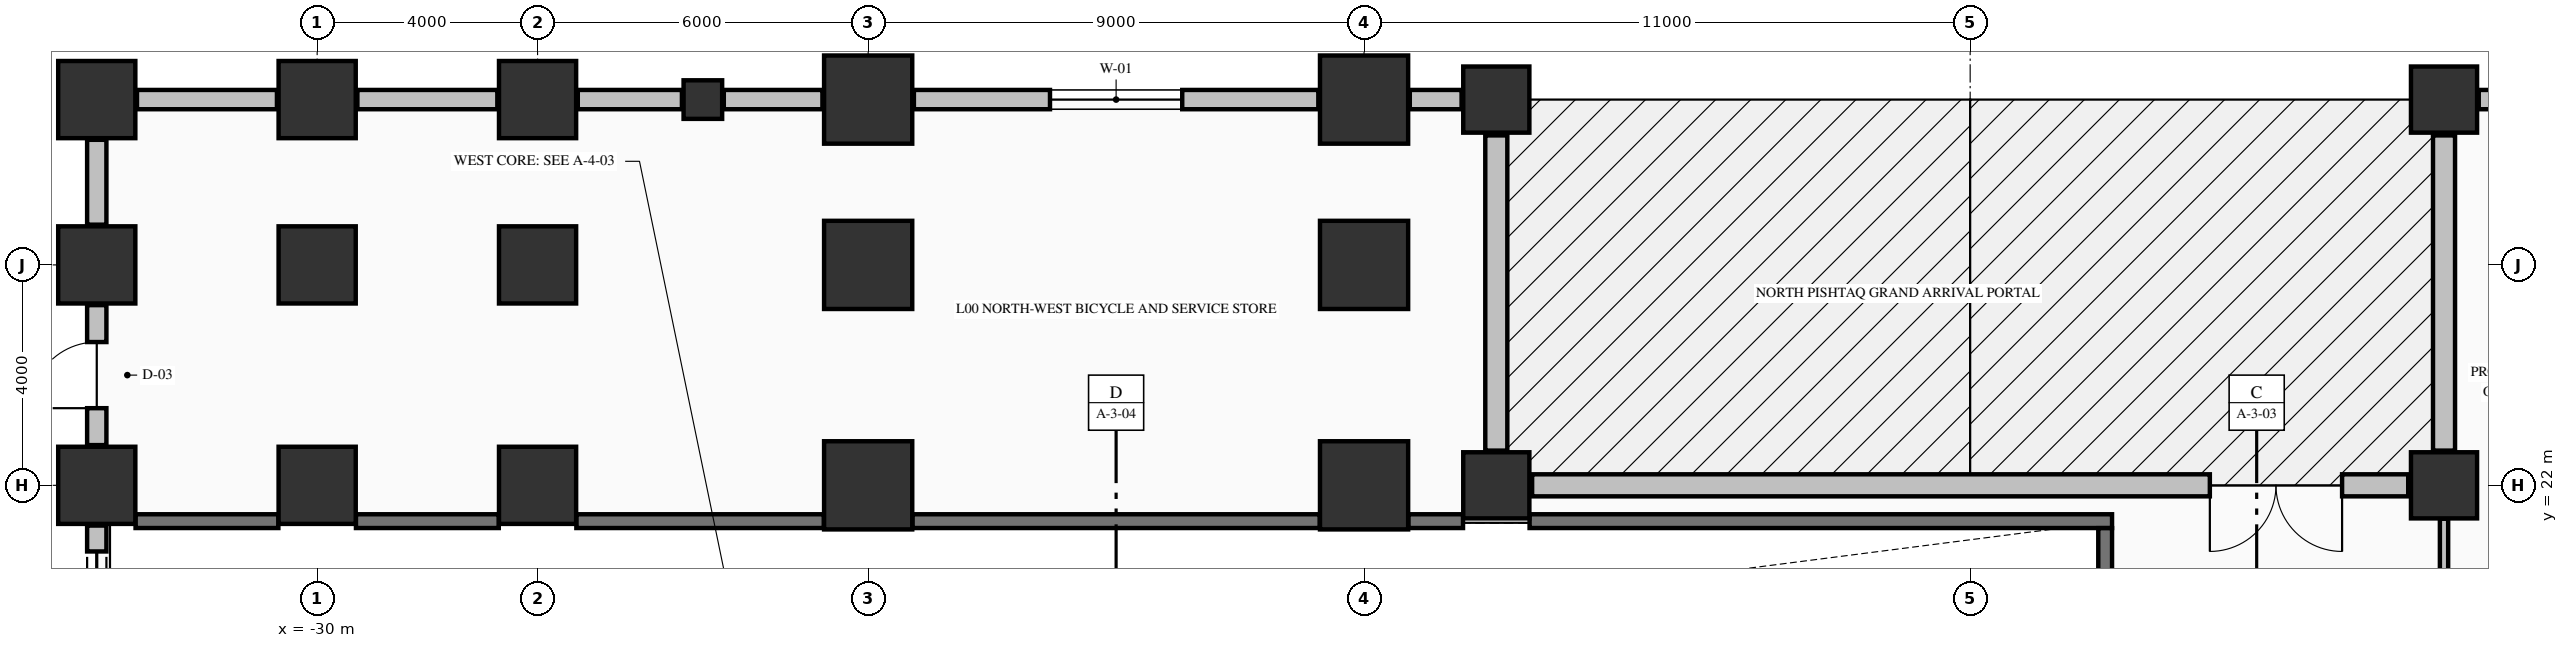
"""IFC4 building model, lengths in metres.
Left out: names, types, materials, properties, quantities, classifications, styles, units other than length and angle.
Written with IfcOpenShell. Run it as: python <this file> out.ifc"""

import sys

from ifc_helpers import new_model, si_unit, direction, frame, frame_2d, origin, origin_2d, place, context, subcontext, project, spatial, rectangle, extrude, element, fill, save


model = new_model("IFC4")
c1 = context("Model", 3, precision=1e-05, world=origin(), true_north=direction((0.0, 1.0)))
c2 = subcontext(c1, "Body", "Model", "MODEL_VIEW")
j1 = project(units=[si_unit("LENGTHUNIT", "METRE"), si_unit("PLANEANGLEUNIT", "RADIAN")], contexts=[c1])
p1 = place(None, origin())
s1 = spatial("IfcSite", under=j1, at=p1, CompositionType="ELEMENT")
p2 = place(p1, origin())
s2 = spatial("IfcBuilding", under=s1, at=p2, CompositionType="ELEMENT")
p3 = place(p2, origin())
s3 = spatial("IfcBuildingStorey", under=s2, at=p3, CompositionType="ELEMENT", Elevation=0.0)
for number, where, z_axis, x_axis in (
    (1, (-34.0, 22.0, 0.0), (0.0, 0.0, 1.0), (1.0, 0.0, 0.0)),
    (2, (-34.0, 26.0, 0.0), (0.0, 0.0, 1.0), (1.0, 0.0, 0.0)),
    (3, (-34.0, 29.0, 0.0), (0.0, 0.0, 1.0), (1.0, 0.0, 0.0)),
    (4, (-30.0, 22.0, 0.0), (0.0, 0.0, 1.0), (1.0, 0.0, 0.0)),
    (5, (-30.0, 26.0, 0.0), (0.0, 0.0, 1.0), (1.0, 0.0, 0.0)),
    (6, (-30.0, 29.0, 0.0), (0.0, 0.0, 1.0), (1.0, 0.0, 0.0)),
    (7, (-26.0, 22.0, 0.0), (0.0, 0.0, 1.0), (1.0, 0.0, 0.0)),
    (8, (-26.0, 26.0, 0.0), (0.0, 0.0, 1.0), (1.0, 0.0, 0.0)),
    (9, (-26.0, 29.0, 0.0), (0.0, 0.0, 1.0), (1.0, 0.0, 0.0)),
):
    element("IfcColumn", number, at=place(p3, frame(where, z_axis=z_axis, x_axis=x_axis)), inside=s3, PredefinedType="COLUMN", context=c2, shape_type="SweptSolid", body=[
        extrude(rectangle(XDim=1.4, YDim=1.4, at=origin_2d()), origin(), (0.0, 0.0, 1.0), 5.09),
    ])
for number, where, z_axis, x_axis in (
    (10, (-20.0, 22.0, 0.0), (0.0, 0.0, 1.0), (1.0, 0.0, 0.0)),
    (11, (-20.0, 26.0, 0.0), (0.0, 0.0, 1.0), (1.0, 0.0, 0.0)),
    (12, (-20.0, 29.0, 0.0), (0.0, 0.0, 1.0), (1.0, 0.0, 0.0)),
    (13, (-11.0, 22.0, 0.0), (0.0, 0.0, 1.0), (1.0, 0.0, 0.0)),
    (14, (-11.0, 26.0, 0.0), (0.0, 0.0, 1.0), (1.0, 0.0, 0.0)),
    (15, (-11.0, 29.0, 0.0), (0.0, 0.0, 1.0), (1.0, 0.0, 0.0)),
):
    element("IfcColumn", number, at=place(p3, frame(where, z_axis=z_axis, x_axis=x_axis)), inside=s3, PredefinedType="COLUMN", context=c2, shape_type="SweptSolid", body=[
        extrude(rectangle(XDim=1.6, YDim=1.6, at=origin_2d()), origin(), (0.0, 0.0, 1.0), 5.09),
    ])
for number, where, z_axis, x_axis in (
    (16, (-8.6, 22.0, 0.0), (0.0, 0.0, 1.0), (1.0, 0.0, 0.0)),
    (17, (8.6, 22.0, 0.0), (0.0, 0.0, 1.0), (1.0, 0.0, 0.0)),
    (18, (-8.6, 29.0, 0.0), (0.0, 0.0, 1.0), (1.0, 0.0, 0.0)),
    (19, (8.6, 29.0, 0.0), (0.0, 0.0, 1.0), (1.0, 0.0, 0.0)),
):
    element("IfcColumn", number, at=place(p3, frame(where, z_axis=z_axis, x_axis=x_axis)), inside=s3, PredefinedType="COLUMN", context=c2, shape_type="SweptSolid", body=[
        extrude(rectangle(XDim=1.2, YDim=1.2, at=origin_2d()), origin(), (0.0, 0.0, 1.0), 5.09),
    ])
p4 = place(p3, frame((-23.0, 29.0, 0.0), z_axis=(0.0, 0.0, 1.0), x_axis=(1.0, 0.0, 0.0)))
e20 = element("IfcColumn", 20, at=p4, inside=s3, PredefinedType="PILASTER", context=c2, shape_type="SweptSolid", body=[
    extrude(rectangle(XDim=0.7, YDim=0.7, at=origin_2d()), origin(), (0.0, 0.0, 1.0), 5.09),
])
for number, where, z_axis, x_axis in (
    (21, (-30.73, 29.0, 0.0), (0.0, 0.0, 1.0), (-1.0, 0.0, 0.0)),
    (22, (-26.73, 29.0, 0.0), (0.0, 0.0, 1.0), (-1.0, 0.0, 0.0)),
):
    element("IfcWall", number, at=place(p3, frame(where, z_axis=z_axis, x_axis=x_axis)), inside=s3, PredefinedType="STANDARD", context=c2, shape_type="SweptSolid", body=[
        extrude(rectangle(XDim=2.54, YDim=0.35, at=frame_2d((1.27, 0.0))), origin(), (0.0, 0.0, 1.0), 4.482),
    ])
p5 = place(p3, frame((-23.38, 29.0, 0.0), z_axis=(0.0, 0.0, 1.0), x_axis=(-1.0, 0.0, 0.0)))
e23 = element("IfcWall", 23, at=p5, inside=s3, PredefinedType="STANDARD", context=c2, shape_type="SweptSolid", body=[
    extrude(rectangle(XDim=1.89, YDim=0.35, at=frame_2d((0.945, 0.0))), origin(), (0.0, 0.0, 1.0), 4.482),
])
p6 = place(p3, frame((-20.83, 29.0, 0.0), z_axis=(0.0, 0.0, 1.0), x_axis=(-1.0, 0.0, 0.0)))
e24 = element("IfcWall", 24, at=p6, inside=s3, PredefinedType="STANDARD", context=c2, shape_type="SweptSolid", body=[
    extrude(rectangle(XDim=1.79, YDim=0.35, at=frame_2d((0.895, 0.0))), origin(), (0.0, 0.0, 1.0), 4.482),
])
p7 = place(p3, frame((-11.83, 29.0, 0.0), z_axis=(0.0, 0.0, 1.0), x_axis=(-1.0, 0.0, 0.0)))
e25 = element("IfcWall", 25, at=p7, inside=s3, PredefinedType="STANDARD", context=c2, shape_type="SweptSolid", body=[
    extrude(rectangle(XDim=7.34, YDim=0.35, at=frame_2d((3.67, 0.0))), origin(), (0.0, 0.0, 1.0), 4.482),
])
p8 = place(p7, frame((2.47, 0.0, 0.85)))
e26 = element("IfcOpeningElement", 26, at=p8, cuts=e25, PredefinedType="OPENING", context=c2, shape_type="SweptSolid", body=[
    extrude(rectangle(XDim=2.4, YDim=2.1, at=frame_2d((1.2, 1.05))), frame((0.0, 0.185, 0.0), z_axis=(0.0, -1.0, 0.0), x_axis=(1.0, 0.0, 0.0)), (0.0, 0.0, 1.0), 0.37),
])
for number, where, z_axis, x_axis in (
    (27, (-9.23, 29.0, 0.0), (0.0, 0.0, 1.0), (-1.0, 0.0, 0.0)),
    (28, (10.17, 29.0, 0.0), (0.0, 0.0, 1.0), (-1.0, 0.0, 0.0)),
):
    element("IfcWall", number, at=place(p3, frame(where, z_axis=z_axis, x_axis=x_axis)), inside=s3, PredefinedType="STANDARD", context=c2, shape_type="SweptSolid", body=[
        extrude(rectangle(XDim=0.94, YDim=0.35, at=frame_2d((0.47, 0.0))), origin(), (0.0, 0.0, 1.0), 4.482),
    ])
p9 = place(p3, frame((-34.0, 16.73, 0.0), z_axis=(0.0, 0.0, 1.0), x_axis=(0.0, 1.0, 0.0)))
e29 = element("IfcWall", 29, at=p9, inside=s3, PredefinedType="STANDARD", context=c2, shape_type="SweptSolid", body=[
    extrude(rectangle(XDim=4.54, YDim=0.35, at=frame_2d((2.27, 0.0))), origin(), (0.0, 0.0, 1.0), 4.482),
])
p10 = place(p9, frame((0.47, 0.0, 0.0)))
e30 = element("IfcOpeningElement", 30, at=p10, cuts=e29, PredefinedType="OPENING", context=c2, shape_type="SweptSolid", body=[
    extrude(rectangle(XDim=3.6, YDim=3.2, at=frame_2d((1.8, 1.6))), frame((0.0, 0.185, 0.0), z_axis=(0.0, -1.0, 0.0), x_axis=(1.0, 0.0, 0.0)), (0.0, 0.0, 1.0), 0.37),
])
p11 = place(p3, frame((-34.0, 22.73, 0.0), z_axis=(0.0, 0.0, 1.0), x_axis=(0.0, 1.0, 0.0)))
e31 = element("IfcWall", 31, at=p11, inside=s3, PredefinedType="STANDARD", context=c2, shape_type="SweptSolid", body=[
    extrude(rectangle(XDim=2.54, YDim=0.35, at=frame_2d((1.27, 0.0))), origin(), (0.0, 0.0, 1.0), 4.482),
])
p12 = place(p11, frame((0.67, 0.0, 0.0)))
e32 = element("IfcOpeningElement", 32, at=p12, cuts=e31, PredefinedType="OPENING", context=c2, shape_type="SweptSolid", body=[
    extrude(rectangle(XDim=1.2, YDim=2.2, at=frame_2d((0.6, 1.1))), frame((0.0, 0.185, 0.0), z_axis=(0.0, -1.0, 0.0), x_axis=(1.0, 0.0, 0.0)), (0.0, 0.0, 1.0), 0.37),
])
p13 = place(p3, frame((-34.0, 26.73, 0.0), z_axis=(0.0, 0.0, 1.0), x_axis=(0.0, 1.0, 0.0)))
e33 = element("IfcWall", 33, at=p13, inside=s3, PredefinedType="STANDARD", context=c2, shape_type="SweptSolid", body=[
    extrude(rectangle(XDim=1.54, YDim=0.35, at=frame_2d((0.77, 0.0))), origin(), (0.0, 0.0, 1.0), 4.482),
])
for number, where, z_axis, x_axis in (
    (34, (-8.6, 22.63, 0.0), (0.0, 0.0, 1.0), (0.0, 1.0, 0.0)),
    (35, (8.6, 28.35, 0.0), (0.0, 0.0, 1.0), (0.0, -1.0, 0.0)),
):
    element("IfcWall", number, at=place(p3, frame(where, z_axis=z_axis, x_axis=x_axis)), inside=s3, PredefinedType="STANDARD", context=c2, shape_type="SweptSolid", body=[
        extrude(rectangle(XDim=5.72, YDim=0.4, at=frame_2d((2.86, 0.0))), origin(), (0.0, 0.0, 1.0), 4.132),
    ])
p14 = place(p3, frame((7.95, 22.0, 0.0), z_axis=(0.0, 0.0, 1.0), x_axis=(-1.0, 0.0, 0.0)))
e36 = element("IfcWall", 36, at=p14, inside=s3, PredefinedType="STANDARD", context=c2, shape_type="SweptSolid", body=[
    extrude(rectangle(XDim=15.9, YDim=0.4, at=frame_2d((7.95, 0.0))), origin(), (0.0, 0.0, 1.0), 4.132),
])
p15 = place(p14, frame((1.2, 0.0, 0.0)))
e37 = element("IfcOpeningElement", 37, at=p15, cuts=e36, PredefinedType="OPENING", context=c2, shape_type="SweptSolid", body=[
    extrude(rectangle(XDim=2.4, YDim=2.6, at=frame_2d((1.2, 1.3))), frame((0.0, 0.21, 0.0), z_axis=(0.0, -1.0, 0.0), x_axis=(1.0, 0.0, 0.0)), (0.0, 0.0, 1.0), 0.42),
])
for number, where, z_axis, x_axis in (
    (38, (-33.296, 21.35, 0.0), (0.0, 0.0, 1.0), (1.0, 0.0, 0.0)),
    (39, (-29.296, 21.35, 0.0), (0.0, 0.0, 1.0), (1.0, 0.0, 0.0)),
):
    element("IfcWall", number, at=place(p3, frame(where, z_axis=z_axis, x_axis=x_axis)), inside=s3, PredefinedType="SOLIDWALL", context=c2, shape_type="SweptSolid", body=[
        extrude(rectangle(XDim=2.592, YDim=0.25, at=frame_2d((1.296, 0.0))), origin(), (0.0, 0.0, 1.0), 5.09),
    ])
p16 = place(p3, frame((-25.296, 21.35, 0.0), z_axis=(0.0, 0.0, 1.0), x_axis=(1.0, 0.0, 0.0)))
e40 = element("IfcWall", 40, at=p16, inside=s3, PredefinedType="SOLIDWALL", context=c2, shape_type="SweptSolid", body=[
    extrude(rectangle(XDim=4.492, YDim=0.25, at=frame_2d((2.246, 0.0))), origin(), (0.0, 0.0, 1.0), 5.09),
])
p17 = place(p3, frame((-19.196, 21.35, 0.0), z_axis=(0.0, 0.0, 1.0), x_axis=(1.0, 0.0, 0.0)))
e41 = element("IfcWall", 41, at=p17, inside=s3, PredefinedType="SOLIDWALL", context=c2, shape_type="SweptSolid", body=[
    extrude(rectangle(XDim=7.392, YDim=0.25, at=frame_2d((3.696, 0.0))), origin(), (0.0, 0.0, 1.0), 5.09),
])
p18 = place(p3, frame((-10.196, 21.35, 0.0), z_axis=(0.0, 0.0, 1.0), x_axis=(1.0, 0.0, 0.0)))
e42 = element("IfcWall", 42, at=p18, inside=s3, PredefinedType="SOLIDWALL", context=c2, shape_type="SweptSolid", body=[
    extrude(rectangle(XDim=0.992, YDim=0.25, at=frame_2d((0.496, 0.0))), origin(), (0.0, 0.0, 1.0), 5.09),
])
p19 = place(p3, frame((-7.996, 21.35, 0.0), z_axis=(0.0, 0.0, 1.0), x_axis=(1.0, 0.0, 0.0)))
e43 = element("IfcWall", 43, at=p19, inside=s3, PredefinedType="SOLIDWALL", context=c2, shape_type="SweptSolid", body=[
    extrude(rectangle(XDim=10.571, YDim=0.25, at=frame_2d((5.286, 0.0))), origin(), (0.0, 0.0, 1.0), 5.09),
])
p20 = place(p3, frame((2.45, 16.777, 0.0), z_axis=(0.0, 0.0, 1.0), x_axis=(0.0, 1.0, 0.0)))
e44 = element("IfcWall", 44, at=p20, inside=s3, PredefinedType="SOLIDWALL", context=c2, shape_type="SweptSolid", body=[
    extrude(rectangle(XDim=4.446, YDim=0.25, at=frame_2d((2.223, 0.0))), origin(), (0.0, 0.0, 1.0), 5.09),
])
p21 = place(p3, frame((8.6, 18.728, 0.0), z_axis=(0.0, 0.0, 1.0), x_axis=(0.0, 1.0, 0.0)))
e45 = element("IfcWall", 45, at=p21, inside=s3, PredefinedType="PARTITIONING", context=c2, shape_type="SweptSolid", body=[
    extrude(rectangle(XDim=2.666, YDim=0.15, at=frame_2d((1.333, 0.0))), origin(), (0.0, 0.0, 1.0), 4.132),
])
p22 = place(p8, origin())
e46 = element("IfcWindow", 46, at=p22, inside=s3, PartitioningType="SINGLE_PANEL", PredefinedType="WINDOW", context=c2, shape_type="SweptSolid", body=[
    extrude(rectangle(XDim=2.4, YDim=2.1, at=frame_2d((1.2, 1.05))), frame((0.0, 0.03, 0.0), z_axis=(0.0, -1.0, 0.0), x_axis=(1.0, 0.0, 0.0)), (0.0, 0.0, 1.0), 0.06),
])
fill(e26, e46)
p23 = place(p10, origin())
e47 = element("IfcDoor", 47, at=p23, inside=s3, OperationType="ROLLINGUP", PredefinedType="DOOR", context=c2, shape_type="SweptSolid", body=[
    extrude(rectangle(XDim=3.6, YDim=3.2, at=frame_2d((1.8, 1.6))), frame((0.0, 0.025, 0.0), z_axis=(0.0, -1.0, 0.0), x_axis=(1.0, 0.0, 0.0)), (0.0, 0.0, 1.0), 0.05),
])
fill(e30, e47)
p24 = place(p12, origin())
e48 = element("IfcDoor", 48, at=p24, inside=s3, OperationType="SINGLE_SWING_LEFT", PredefinedType="DOOR", context=c2, shape_type="SweptSolid", body=[
    extrude(rectangle(XDim=1.2, YDim=2.2, at=frame_2d((0.6, 1.1))), frame((0.0, 0.025, 0.0), z_axis=(0.0, -1.0, 0.0), x_axis=(1.0, 0.0, 0.0)), (0.0, 0.0, 1.0), 0.05),
])
fill(e32, e48)
p25 = place(p15, origin())
e49 = element("IfcDoor", 49, at=p25, inside=s3, OperationType="DOUBLE_DOOR_DOUBLE_SWING", PredefinedType="DOOR", context=c2, shape_type="SweptSolid", body=[
    extrude(rectangle(XDim=2.4, YDim=2.6, at=frame_2d((1.2, 1.3))), frame((0.0, 0.025, 0.0), z_axis=(0.0, -1.0, 0.0), x_axis=(1.0, 0.0, 0.0)), (0.0, 0.0, 1.0), 0.05),
])
fill(e37, e49)
save(model, sys.argv[1])
